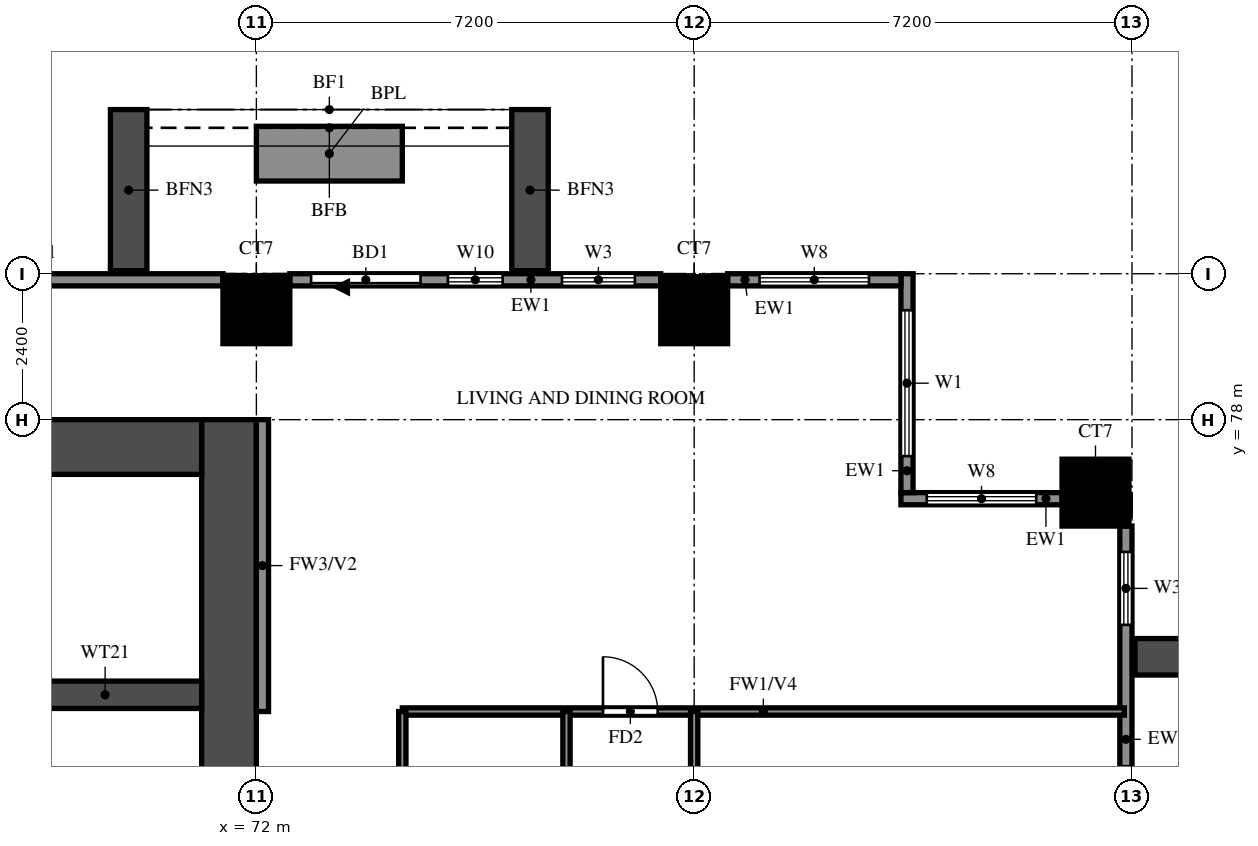
"""IFC4 building model, lengths in metres.
Left out: names, types, materials, properties, quantities, classifications, styles, units other than length and angle.
Written with IfcOpenShell. Run it as: python <this file> out.ifc"""

import sys

from ifc_helpers import new_model, si_unit, direction, frame, frame_2d, origin, origin_2d, place, context, subcontext, project, spatial, rectangle, extrude, source, transform, mapped, element, fill, save


model = new_model("IFC4")
c1 = context("Model", 3, precision=1e-05, world=origin(), true_north=direction((0.0, 1.0)))
c2 = subcontext(c1, "Body", "Model", "MODEL_VIEW")
j1 = project(units=[si_unit("LENGTHUNIT", "METRE"), si_unit("PLANEANGLEUNIT", "RADIAN")], contexts=[c1])
p1 = place(None, origin())
s1 = spatial("IfcSite", under=j1, at=p1, CompositionType="ELEMENT")
p2 = place(p1, origin())
s2 = spatial("IfcBuilding", under=s1, at=p2, CompositionType="ELEMENT")
p3 = place(p2, frame((0.0, 0.0, 48.0)))
s3 = spatial("IfcBuildingStorey", under=s2, at=p3, CompositionType="ELEMENT", Elevation=48.0)
m1 = source(origin(), c2, "Body", "SweptSolid", [
    extrude(rectangle(XDim=1.1, YDim=1.1, at=origin_2d()), origin(), (0.0, 0.0, 1.0), 3.18),
])
for number, where, z_axis, x_axis in (
    (1, (85.8, 76.8, 0.0), (0.0, 0.0, 1.0), (1.0, 0.0, 0.0)),
    (2, (72.0, 79.8, 0.0), (0.0, 0.0, 1.0), (1.0, 0.0, 0.0)),
    (3, (79.2, 79.8, 0.0), (0.0, 0.0, 1.0), (1.0, 0.0, 0.0)),
):
    element("IfcColumn", number, at=place(p3, frame(where, z_axis=z_axis, x_axis=x_axis)), inside=s3, PredefinedType="COLUMN", context=c2, shape_type="MappedRepresentation", body=[
        mapped(m1, transform((0.0, 0.0, 0.0))),
    ])
p4 = place(p3, frame((71.55, 66.0, 0.0), z_axis=(0.0, 0.0, 1.0), x_axis=(0.0, 1.0, 0.0)))
e4 = element("IfcWall", 4, at=p4, inside=s3, PredefinedType="SHEAR", context=c2, shape_type="SweptSolid", body=[
    extrude(rectangle(XDim=12.0, YDim=0.9, at=frame_2d((6.0, 0.0))), origin(), (0.0, 0.0, 1.0), 3.18),
])
p5 = place(p3, frame((29.7, 77.55, 0.0), z_axis=(0.0, 0.0, 1.0), x_axis=(1.0, 0.0, 0.0)))
e5 = element("IfcWall", 5, at=p5, inside=s3, PredefinedType="SHEAR", context=c2, shape_type="SweptSolid", body=[
    extrude(rectangle(XDim=41.4, YDim=0.9, at=frame_2d((20.7, 0.0))), origin(), (0.0, 0.0, 1.0), 3.18),
])
p6 = place(p3, frame((67.925, 73.475, 0.0), z_axis=(0.0, 0.0, 1.0), x_axis=(1.0, 0.0, 0.0)))
e6 = element("IfcWall", 6, at=p6, inside=s3, PredefinedType="SHEAR", context=c2, shape_type="SweptSolid", body=[
    extrude(rectangle(XDim=3.175, YDim=0.45, at=frame_2d((1.587, 0.0))), origin(), (0.0, 0.0, 1.0), 3.18),
])
p7 = place(p3, frame((86.3, 70.15, 0.0), z_axis=(0.0, 0.0, 1.0), x_axis=(0.0, 1.0, 0.0)))
e7 = element("IfcWall", 7, at=p7, inside=s3, PredefinedType="SOLIDWALL", context=c2, shape_type="SweptSolid", body=[
    extrude(rectangle(XDim=6.1, YDim=0.2, at=frame_2d((3.05, 0.0))), origin(), (0.0, 0.0, 1.0), 3.18),
])
p8 = place(p7, frame((0.35, 0.0, 0.0)))
e8 = element("IfcOpeningElement", 8, at=p8, cuts=e7, PredefinedType="OPENING", context=c2, shape_type="SweptSolid", body=[
    extrude(rectangle(XDim=1.8, YDim=2.4, at=frame_2d((0.9, 1.2))), frame((0.0, 0.11, 0.0), z_axis=(0.0, -1.0, 0.0), x_axis=(1.0, 0.0, 0.0)), (0.0, 0.0, 1.0), 0.22),
])
p9 = place(p7, frame((4.475, 0.0, 0.6)))
e9 = element("IfcOpeningElement", 9, at=p9, cuts=e7, PredefinedType="OPENING", context=c2, shape_type="SweptSolid", body=[
    extrude(rectangle(XDim=1.2, YDim=2.4, at=frame_2d((0.6, 1.2))), frame((0.0, 0.11, 0.0), z_axis=(0.0, -1.0, 0.0), x_axis=(1.0, 0.0, 0.0)), (0.0, 0.0, 1.0), 0.22),
])
p10 = place(p3, frame((85.25, 76.7, 0.0), z_axis=(0.0, 0.0, 1.0), x_axis=(-1.0, 0.0, 0.0)))
e10 = element("IfcWall", 10, at=p10, inside=s3, PredefinedType="SOLIDWALL", context=c2, shape_type="SweptSolid", body=[
    extrude(rectangle(XDim=2.65, YDim=0.2, at=frame_2d((1.325, 0.0))), origin(), (0.0, 0.0, 1.0), 3.18),
])
p11 = place(p10, frame((0.425, 0.0, 0.6)))
e11 = element("IfcOpeningElement", 11, at=p11, cuts=e10, PredefinedType="OPENING", context=c2, shape_type="SweptSolid", body=[
    extrude(rectangle(XDim=1.8, YDim=2.4, at=frame_2d((0.9, 1.2))), frame((0.0, 0.11, 0.0), z_axis=(0.0, -1.0, 0.0), x_axis=(1.0, 0.0, 0.0)), (0.0, 0.0, 1.0), 0.22),
])
p12 = place(p3, frame((82.7, 76.8, 0.0), z_axis=(0.0, 0.0, 1.0), x_axis=(0.0, 1.0, 0.0)))
e12 = element("IfcWall", 12, at=p12, inside=s3, PredefinedType="SOLIDWALL", context=c2, shape_type="SweptSolid", body=[
    extrude(rectangle(XDim=3.6, YDim=0.2, at=frame_2d((1.8, 0.0))), origin(), (0.0, 0.0, 1.0), 3.18),
])
p13 = place(p12, frame((0.6, 0.0, 0.6)))
e13 = element("IfcOpeningElement", 13, at=p13, cuts=e12, PredefinedType="OPENING", context=c2, shape_type="SweptSolid", body=[
    extrude(rectangle(XDim=2.4, YDim=2.4, at=frame_2d((1.2, 1.2))), frame((0.0, 0.11, 0.0), z_axis=(0.0, -1.0, 0.0), x_axis=(1.0, 0.0, 0.0)), (0.0, 0.0, 1.0), 0.22),
])
p14 = place(p3, frame((82.6, 80.3, 0.0), z_axis=(0.0, 0.0, 1.0), x_axis=(-1.0, 0.0, 0.0)))
e14 = element("IfcWall", 14, at=p14, inside=s3, PredefinedType="SOLIDWALL", context=c2, shape_type="SweptSolid", body=[
    extrude(rectangle(XDim=2.85, YDim=0.2, at=frame_2d((1.425, 0.0))), origin(), (0.0, 0.0, 1.0), 3.18),
])
p15 = place(p14, frame((0.525, 0.0, 0.6)))
e15 = element("IfcOpeningElement", 15, at=p15, cuts=e14, PredefinedType="OPENING", context=c2, shape_type="SweptSolid", body=[
    extrude(rectangle(XDim=1.8, YDim=2.4, at=frame_2d((0.9, 1.2))), frame((0.0, 0.11, 0.0), z_axis=(0.0, -1.0, 0.0), x_axis=(1.0, 0.0, 0.0)), (0.0, 0.0, 1.0), 0.22),
])
p16 = place(p3, frame((78.65, 80.3, 0.0), z_axis=(0.0, 0.0, 1.0), x_axis=(-1.0, 0.0, 0.0)))
e16 = element("IfcWall", 16, at=p16, inside=s3, PredefinedType="SOLIDWALL", context=c2, shape_type="SweptSolid", body=[
    extrude(rectangle(XDim=6.1, YDim=0.2, at=frame_2d((3.05, 0.0))), origin(), (0.0, 0.0, 1.0), 3.18),
])
p17 = place(p16, frame((3.95, 0.0, 0.0)))
e17 = element("IfcOpeningElement", 17, at=p17, cuts=e16, PredefinedType="OPENING", context=c2, shape_type="SweptSolid", body=[
    extrude(rectangle(XDim=1.8, YDim=2.4, at=frame_2d((0.9, 1.2))), frame((0.0, 0.11, 0.0), z_axis=(0.0, -1.0, 0.0), x_axis=(1.0, 0.0, 0.0)), (0.0, 0.0, 1.0), 0.22),
])
p18 = place(p16, frame((0.425, 0.0, 0.6)))
e18 = element("IfcOpeningElement", 18, at=p18, cuts=e16, PredefinedType="OPENING", context=c2, shape_type="SweptSolid", body=[
    extrude(rectangle(XDim=1.2, YDim=2.4, at=frame_2d((0.6, 1.2))), frame((0.0, 0.11, 0.0), z_axis=(0.0, -1.0, 0.0), x_axis=(1.0, 0.0, 0.0)), (0.0, 0.0, 1.0), 0.22),
])
p19 = place(p16, frame((2.6, 0.0, 0.6)))
e19 = element("IfcOpeningElement", 19, at=p19, cuts=e16, PredefinedType="OPENING", context=c2, shape_type="SweptSolid", body=[
    extrude(rectangle(XDim=0.9, YDim=2.4, at=frame_2d((0.45, 1.2))), frame((0.0, 0.11, 0.0), z_axis=(0.0, -1.0, 0.0), x_axis=(1.0, 0.0, 0.0)), (0.0, 0.0, 1.0), 0.22),
])
p20 = place(p3, frame((71.45, 80.3, 0.0), z_axis=(0.0, 0.0, 1.0), x_axis=(-1.0, 0.0, 0.0)))
e20 = element("IfcWall", 20, at=p20, inside=s3, PredefinedType="SOLIDWALL", context=c2, shape_type="SweptSolid", body=[
    extrude(rectangle(XDim=6.1, YDim=0.2, at=frame_2d((3.05, 0.0))), origin(), (0.0, 0.0, 1.0), 3.18),
])
for number, where, z_axis, x_axis in (
    (21, (86.45, 74.1, 0.0), (0.0, 0.0, 1.0), (1.0, 0.0, 0.0)),
    (22, (76.5, 80.45, 0.0), (0.0, 0.0, 1.0), (0.0, 1.0, 0.0)),
    (23, (69.9, 80.45, 0.0), (0.0, 0.0, 1.0), (0.0, 1.0, 0.0)),
):
    element("IfcWall", number, at=place(p3, frame(where, z_axis=z_axis, x_axis=x_axis)), inside=s3, PredefinedType="SOLIDWALL", context=c2, shape_type="SweptSolid", body=[
        extrude(rectangle(XDim=2.65, YDim=0.6, at=frame_2d((1.325, 0.0))), origin(), (0.0, 0.0, 1.0), 2.85),
    ])
p21 = place(p3, frame((74.4, 82.375, 0.0), z_axis=(0.0, 0.0, 1.0), x_axis=(-1.0, 0.0, 0.0)))
e24 = element("IfcWall", 24, at=p21, inside=s3, PredefinedType="SOLIDWALL", context=c2, shape_type="SweptSolid", body=[
    extrude(rectangle(XDim=2.4, YDim=0.9, at=frame_2d((1.2, 0.0))), origin(), (0.0, 0.0, 1.0), 0.9),
])
p22 = place(p3, frame((72.1, 73.2, 0.0), z_axis=(0.0, 0.0, 1.0), x_axis=(0.0, 1.0, 0.0)))
e25 = element("IfcWall", 25, at=p22, inside=s3, PredefinedType="SOLIDWALL", context=c2, shape_type="SweptSolid", body=[
    extrude(rectangle(XDim=4.8, YDim=0.2, at=frame_2d((2.4, 0.0))), origin(), (0.0, 0.0, 1.0), 3.18),
])
p23 = place(p3, frame((74.4, 73.2, 0.0), z_axis=(0.0, 0.0, 1.0), x_axis=(1.0, 0.0, 0.0)))
e26 = element("IfcWall", 26, at=p23, inside=s3, PredefinedType="PARTITIONING", context=c2, shape_type="SweptSolid", body=[
    extrude(rectangle(XDim=11.875, YDim=0.12, at=frame_2d((5.938, 0.0))), origin(), (0.0, 0.0, 1.0), 2.28),
])
p24 = place(p23, frame((3.3, 0.0, 0.0)))
e27 = element("IfcOpeningElement", 27, at=p24, cuts=e26, PredefinedType="OPENING", context=c2, shape_type="SweptSolid", body=[
    extrude(rectangle(XDim=0.9, YDim=2.1, at=frame_2d((0.45, 1.05))), frame((0.0, 0.07, 0.0), z_axis=(0.0, -1.0, 0.0), x_axis=(1.0, 0.0, 0.0)), (0.0, 0.0, 1.0), 0.14),
])
p25 = place(p3, frame((74.4, 69.62, 0.0), z_axis=(0.0, 0.0, 1.0), x_axis=(0.0, 1.0, 0.0)))
e28 = element("IfcWall", 28, at=p25, inside=s3, PredefinedType="PARTITIONING", context=c2, shape_type="SweptSolid", body=[
    extrude(rectangle(XDim=3.58, YDim=0.12, at=frame_2d((1.79, 0.0))), origin(), (0.0, 0.0, 1.0), 3.18),
])
p26 = place(p3, frame((77.1, 64.8, 0.0), z_axis=(0.0, 0.0, 1.0), x_axis=(0.0, 1.0, 0.0)))
e29 = element("IfcWall", 29, at=p26, inside=s3, PredefinedType="PARTITIONING", context=c2, shape_type="SweptSolid", body=[
    extrude(rectangle(XDim=8.4, YDim=0.12, at=frame_2d((4.2, 0.0))), origin(), (0.0, 0.0, 1.0), 3.18),
])
p27 = place(p26, frame((1.875, 0.0, 0.0)))
e30 = element("IfcOpeningElement", 30, at=p27, cuts=e29, PredefinedType="OPENING", context=c2, shape_type="SweptSolid", body=[
    extrude(rectangle(XDim=0.9, YDim=2.1, at=frame_2d((0.45, 1.05))), frame((0.0, 0.07, 0.0), z_axis=(0.0, -1.0, 0.0), x_axis=(1.0, 0.0, 0.0)), (0.0, 0.0, 1.0), 0.14),
])
p28 = place(p26, frame((6.125, 0.0, 0.0)))
e31 = element("IfcOpeningElement", 31, at=p28, cuts=e29, PredefinedType="OPENING", context=c2, shape_type="SweptSolid", body=[
    extrude(rectangle(XDim=0.8, YDim=2.1, at=frame_2d((0.4, 1.05))), frame((0.0, 0.07, 0.0), z_axis=(0.0, -1.0, 0.0), x_axis=(1.0, 0.0, 0.0)), (0.0, 0.0, 1.0), 0.14),
])
p29 = place(p3, frame((79.2, 69.6, 0.0), z_axis=(0.0, 0.0, 1.0), x_axis=(0.0, 1.0, 0.0)))
e32 = element("IfcWall", 32, at=p29, inside=s3, PredefinedType="PARTITIONING", context=c2, shape_type="SweptSolid", body=[
    extrude(rectangle(XDim=3.6, YDim=0.12, at=frame_2d((1.8, 0.0))), origin(), (0.0, 0.0, 1.0), 3.18),
])
p30 = place(p29, frame((1.35, 0.0, 0.0)))
e33 = element("IfcOpeningElement", 33, at=p30, cuts=e32, PredefinedType="OPENING", context=c2, shape_type="SweptSolid", body=[
    extrude(rectangle(XDim=0.9, YDim=2.1, at=frame_2d((0.45, 1.05))), frame((0.0, 0.07, 0.0), z_axis=(0.0, -1.0, 0.0), x_axis=(1.0, 0.0, 0.0)), (0.0, 0.0, 1.0), 0.14),
])
p31 = place(p9, origin())
e34 = element("IfcWindow", 34, at=p31, inside=s3, PartitioningType="SINGLE_PANEL", PredefinedType="WINDOW", context=c2, shape_type="SweptSolid", body=[
    extrude(rectangle(XDim=1.2, YDim=2.4, at=frame_2d((0.6, 1.2))), frame((0.0, 0.03, 0.0), z_axis=(0.0, -1.0, 0.0), x_axis=(1.0, 0.0, 0.0)), (0.0, 0.0, 1.0), 0.06),
])
fill(e9, e34)
p32 = place(p11, origin())
e35 = element("IfcWindow", 35, at=p32, inside=s3, PartitioningType="DOUBLE_PANEL_VERTICAL", PredefinedType="WINDOW", context=c2, shape_type="SweptSolid", body=[
    extrude(rectangle(XDim=1.8, YDim=2.4, at=frame_2d((0.9, 1.2))), frame((0.0, 0.03, 0.0), z_axis=(0.0, -1.0, 0.0), x_axis=(1.0, 0.0, 0.0)), (0.0, 0.0, 1.0), 0.06),
])
fill(e11, e35)
p33 = place(p13, origin())
e36 = element("IfcWindow", 36, at=p33, inside=s3, PartitioningType="DOUBLE_PANEL_VERTICAL", PredefinedType="WINDOW", context=c2, shape_type="SweptSolid", body=[
    extrude(rectangle(XDim=2.4, YDim=2.4, at=frame_2d((1.2, 1.2))), frame((0.0, 0.03, 0.0), z_axis=(0.0, -1.0, 0.0), x_axis=(1.0, 0.0, 0.0)), (0.0, 0.0, 1.0), 0.06),
])
fill(e13, e36)
p34 = place(p15, origin())
e37 = element("IfcWindow", 37, at=p34, inside=s3, PartitioningType="DOUBLE_PANEL_VERTICAL", PredefinedType="WINDOW", context=c2, shape_type="SweptSolid", body=[
    extrude(rectangle(XDim=1.8, YDim=2.4, at=frame_2d((0.9, 1.2))), frame((0.0, 0.03, 0.0), z_axis=(0.0, -1.0, 0.0), x_axis=(1.0, 0.0, 0.0)), (0.0, 0.0, 1.0), 0.06),
])
fill(e15, e37)
p35 = place(p17, origin())
e38 = element("IfcDoor", 38, at=p35, inside=s3, OperationType="DOUBLE_DOOR_SLIDING", PredefinedType="DOOR", context=c2, shape_type="SweptSolid", body=[
    extrude(rectangle(XDim=1.8, YDim=2.4, at=frame_2d((0.9, 1.2))), frame((0.0, 0.025, 0.0), z_axis=(0.0, -1.0, 0.0), x_axis=(1.0, 0.0, 0.0)), (0.0, 0.0, 1.0), 0.05),
])
fill(e17, e38)
p36 = place(p18, origin())
e39 = element("IfcWindow", 39, at=p36, inside=s3, PartitioningType="SINGLE_PANEL", PredefinedType="WINDOW", context=c2, shape_type="SweptSolid", body=[
    extrude(rectangle(XDim=1.2, YDim=2.4, at=frame_2d((0.6, 1.2))), frame((0.0, 0.03, 0.0), z_axis=(0.0, -1.0, 0.0), x_axis=(1.0, 0.0, 0.0)), (0.0, 0.0, 1.0), 0.06),
])
fill(e18, e39)
p37 = place(p19, origin())
e40 = element("IfcWindow", 40, at=p37, inside=s3, PartitioningType="SINGLE_PANEL", PredefinedType="WINDOW", context=c2, shape_type="SweptSolid", body=[
    extrude(rectangle(XDim=0.9, YDim=2.4, at=frame_2d((0.45, 1.2))), frame((0.0, 0.03, 0.0), z_axis=(0.0, -1.0, 0.0), x_axis=(1.0, 0.0, 0.0)), (0.0, 0.0, 1.0), 0.06),
])
fill(e19, e40)
p38 = place(p24, origin())
e41 = element("IfcDoor", 41, at=p38, inside=s3, OperationType="SINGLE_SWING_LEFT", PredefinedType="DOOR", context=c2, shape_type="SweptSolid", body=[
    extrude(rectangle(XDim=0.9, YDim=2.1, at=frame_2d((0.45, 1.05))), frame((0.0, 0.025, 0.0), z_axis=(0.0, -1.0, 0.0), x_axis=(1.0, 0.0, 0.0)), (0.0, 0.0, 1.0), 0.05),
])
fill(e27, e41)
save(model, sys.argv[1])
